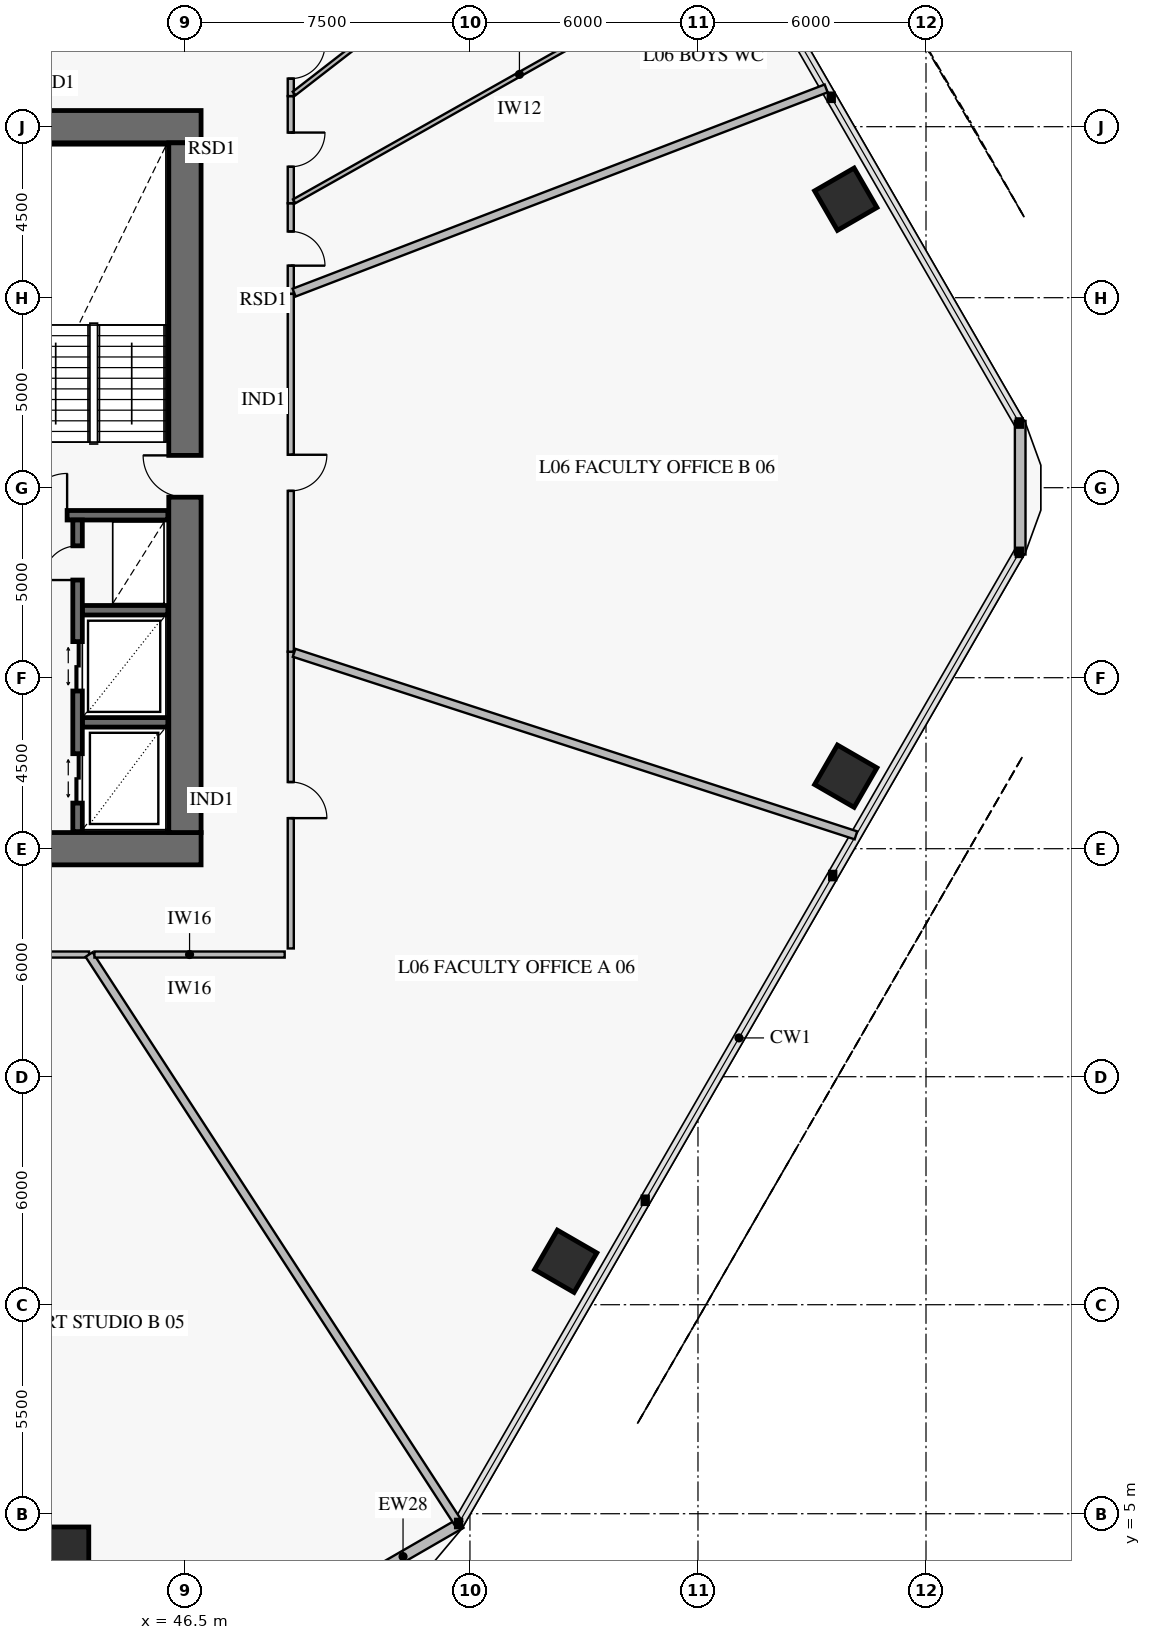
"""IFC4 building model, lengths in metres.
Left out: names, types, materials, properties, quantities, classifications, styles, units other than length and angle.
Written with IfcOpenShell. Run it as: python <this file> out.ifc"""

import sys

from ifc_helpers import new_model, si_unit, direction, frame, frame_2d, origin, origin_2d, place, context, subcontext, project, spatial, rectangle, extrude, element, fill, save


model = new_model("IFC4")
c1 = context("Model", 3, precision=1e-05, world=origin(), true_north=direction((0.0, 1.0)))
c2 = subcontext(c1, "Body", "Model", "MODEL_VIEW")
j1 = project(units=[si_unit("LENGTHUNIT", "METRE"), si_unit("PLANEANGLEUNIT", "RADIAN")], contexts=[c1])
p1 = place(None, origin())
s1 = spatial("IfcSite", under=j1, at=p1, CompositionType="ELEMENT")
p2 = place(p1, origin())
s2 = spatial("IfcBuilding", under=s1, at=p2, CompositionType="ELEMENT")
p3 = place(p2, frame((0.0, 0.0, 24.6)))
s3 = spatial("IfcBuildingStorey", under=s2, at=p3, CompositionType="ELEMENT", Elevation=24.6)
p4 = place(p3, frame((37.35, 22.5, 0.0), z_axis=(0.0, 0.0, 1.0), x_axis=(1.0, 0.0, 0.0)))
e1 = element("IfcWall", 1, at=p4, inside=s3, PredefinedType="SHEAR", context=c2, shape_type="SweptSolid", body=[
    extrude(rectangle(XDim=9.575, YDim=0.85, at=frame_2d((4.788, 0.0))), origin(), (0.0, 0.0, 1.0), 4.2),
])
p5 = place(p4, frame((3.95, 0.0, 0.0)))
e2 = element("IfcOpeningElement", 2, at=p5, cuts=e1, PredefinedType="OPENING", context=c2, shape_type="SweptSolid", body=[
    extrude(rectangle(XDim=1.5, YDim=2.15, at=frame_2d((0.75, 1.075))), frame((0.0, 0.437, 0.0), z_axis=(0.0, -1.0, 0.0), x_axis=(1.0, 0.0, 0.0)), (0.0, 0.0, 1.0), 0.874),
])
p6 = place(p3, frame((46.925, 41.5, 0.0), z_axis=(0.0, 0.0, 1.0), x_axis=(-1.0, 0.0, 0.0)))
e3 = element("IfcWall", 3, at=p6, inside=s3, PredefinedType="SHEAR", context=c2, shape_type="SweptSolid", body=[
    extrude(rectangle(XDim=7.975, YDim=0.85, at=frame_2d((3.988, 0.0))), origin(), (0.0, 0.0, 1.0), 4.2),
])
p7 = place(p3, frame((46.5, 22.925, 0.0), z_axis=(0.0, 0.0, 1.0), x_axis=(0.0, 1.0, 0.0)))
e4 = element("IfcWall", 4, at=p7, inside=s3, PredefinedType="SHEAR", context=c2, shape_type="SweptSolid", body=[
    extrude(rectangle(XDim=18.15, YDim=0.85, at=frame_2d((9.075, 0.0))), origin(), (0.0, 0.0, 1.0), 4.2),
])
p8 = place(p7, frame((8.825, 0.0, 0.0)))
e5 = element("IfcOpeningElement", 5, at=p8, cuts=e4, PredefinedType="OPENING", context=c2, shape_type="SweptSolid", body=[
    extrude(rectangle(XDim=1.1, YDim=2.15, at=frame_2d((0.55, 1.075))), frame((0.0, 0.437, 0.0), z_axis=(0.0, -1.0, 0.0), x_axis=(1.0, 0.0, 0.0)), (0.0, 0.0, 1.0), 0.874),
])
for number, where, z_axis, x_axis in (
    (6, (63.889, 39.592, 0.0), (0.0, 0.0, 1.0), (-0.5, 0.866, 0.0)),
    (7, (43.37, 4.052, 0.0), (0.0, 0.0, 1.0), (1.0, 0.0, 0.0)),
    (8, (56.519, 11.643, 0.0), (0.0, 0.0, 1.0), (0.5, 0.866, 0.0)),
    (9, (63.889, 24.408, 0.0), (0.0, 0.0, 1.0), (0.5, 0.866, 0.0)),
):
    element("IfcColumn", number, at=place(p3, frame(where, z_axis=z_axis, x_axis=x_axis)), inside=s3, PredefinedType="COLUMN", context=c2, shape_type="SweptSolid", body=[
        extrude(rectangle(XDim=1.2, YDim=1.2, at=origin_2d()), origin(), (0.0, 0.0, 1.0), 3.92),
    ])
p9 = place(p3, frame((53.761, 4.751, 0.0), z_axis=(0.0, 0.0, 1.0), x_axis=(-0.866007452331, -0.500031091541, 0.0)))
e10 = element("IfcWall", 10, at=p9, inside=s3, PredefinedType="SOLIDWALL", context=c2, shape_type="SweptSolid", body=[
    extrude(rectangle(XDim=3.515, YDim=0.28, at=frame_2d((1.757, 0.0))), origin(), (0.0, 0.0, 1.0), 3.92),
])
p10 = place(p3, frame((68.479, 33.758, 0.0), z_axis=(0.0, 0.0, 1.0), x_axis=(0.0, -1.0, 0.0)))
e11 = element("IfcWall", 11, at=p10, inside=s3, PredefinedType="SOLIDWALL", context=c2, shape_type="SweptSolid", body=[
    extrude(rectangle(XDim=3.515, YDim=0.28, at=frame_2d((1.758, 0.0))), origin(), (0.0, 0.0, 1.0), 3.92),
])
p11 = place(p3, frame((25.95, 31.275, 0.0), z_axis=(0.0, 0.0, 1.0), x_axis=(1.0, 0.0, 0.0)))
e12 = element("IfcWall", 12, at=p11, inside=s3, PredefinedType="SOLIDWALL", context=c2, shape_type="SweptSolid", body=[
    extrude(rectangle(XDim=20.1, YDim=0.25, at=frame_2d((10.05, 0.0))), origin(), (0.0, 0.0, 1.0), 4.2),
])
p12 = place(p11, frame((2.6, 0.0, 0.0)))
e13 = element("IfcOpeningElement", 13, at=p12, cuts=e12, PredefinedType="OPENING", context=c2, shape_type="SweptSolid", body=[
    extrude(rectangle(XDim=1.1, YDim=2.15, at=frame_2d((0.55, 1.075))), frame((0.0, 0.137, 0.0), z_axis=(0.0, -1.0, 0.0), x_axis=(1.0, 0.0, 0.0)), (0.0, 0.0, 1.0), 0.274),
])
p13 = place(p11, frame((10.6, 0.0, 0.0)))
e14 = element("IfcOpeningElement", 14, at=p13, cuts=e12, PredefinedType="OPENING", context=c2, shape_type="SweptSolid", body=[
    extrude(rectangle(XDim=1.1, YDim=2.15, at=frame_2d((0.55, 1.075))), frame((0.0, 0.137, 0.0), z_axis=(0.0, -1.0, 0.0), x_axis=(1.0, 0.0, 0.0)), (0.0, 0.0, 1.0), 0.274),
])
p14 = place(p11, frame((16.35, 0.0, 0.0)))
e15 = element("IfcOpeningElement", 15, at=p14, cuts=e12, PredefinedType="OPENING", context=c2, shape_type="SweptSolid", body=[
    extrude(rectangle(XDim=1.1, YDim=2.15, at=frame_2d((0.55, 1.075))), frame((0.0, 0.137, 0.0), z_axis=(0.0, -1.0, 0.0), x_axis=(1.0, 0.0, 0.0)), (0.0, 0.0, 1.0), 0.274),
])
for number, where, z_axis, x_axis in (
    (16, (43.8, 25.825, 0.0), (0.0, 0.0, 1.0), (1.0, 0.0, 0.0)),
    (17, (43.8, 28.775, 0.0), (0.0, 0.0, 1.0), (1.0, 0.0, 0.0)),
):
    element("IfcWall", number, at=place(p3, frame(where, z_axis=z_axis, x_axis=x_axis)), inside=s3, PredefinedType="SOLIDWALL", context=c2, shape_type="SweptSolid", body=[
        extrude(rectangle(XDim=2.25, YDim=0.25, at=frame_2d((1.125, 0.0))), origin(), (0.0, 0.0, 1.0), 4.2),
    ])
p15 = place(p3, frame((43.675, 22.95, 0.0), z_axis=(0.0, 0.0, 1.0), x_axis=(0.0, 1.0, 0.0)))
e18 = element("IfcWall", 18, at=p15, inside=s3, PredefinedType="SOLIDWALL", context=c2, shape_type="SweptSolid", body=[
    extrude(rectangle(XDim=8.2, YDim=0.25, at=frame_2d((4.1, 0.0))), origin(), (0.0, 0.0, 1.0), 4.2),
])
p16 = place(p15, frame((0.75, 0.0, 0.0)))
e19 = element("IfcOpeningElement", 19, at=p16, cuts=e18, PredefinedType="OPENING", context=c2, shape_type="SweptSolid", body=[
    extrude(rectangle(XDim=1.3, YDim=2.3, at=frame_2d((0.65, 1.15))), frame((0.0, 0.137, 0.0), z_axis=(0.0, -1.0, 0.0), x_axis=(1.0, 0.0, 0.0)), (0.0, 0.0, 1.0), 0.274),
])
p17 = place(p15, frame((3.7, 0.0, 0.0)))
e20 = element("IfcOpeningElement", 20, at=p17, cuts=e18, PredefinedType="OPENING", context=c2, shape_type="SweptSolid", body=[
    extrude(rectangle(XDim=1.3, YDim=2.3, at=frame_2d((0.65, 1.15))), frame((0.0, 0.137, 0.0), z_axis=(0.0, -1.0, 0.0), x_axis=(1.0, 0.0, 0.0)), (0.0, 0.0, 1.0), 0.274),
])
p18 = place(p15, frame((6.62, 0.0, 0.0)))
e21 = element("IfcOpeningElement", 21, at=p18, cuts=e18, PredefinedType="OPENING", context=c2, shape_type="SweptSolid", body=[
    extrude(rectangle(XDim=0.9, YDim=2.1, at=frame_2d((0.45, 1.05))), frame((0.0, 0.137, 0.0), z_axis=(0.0, -1.0, 0.0), x_axis=(1.0, 0.0, 0.0)), (0.0, 0.0, 1.0), 0.274),
])
p19 = place(p3, frame((49.285, 37.1, 0.0), z_axis=(0.0, 0.0, 1.0), x_axis=(0.0, 1.0, 0.0)))
e22 = element("IfcWall", 22, at=p19, inside=s3, PredefinedType="PARTITIONING", context=c2, shape_type="SweptSolid", body=[
    extrude(rectangle(XDim=2.386, YDim=0.16, at=frame_2d((1.193, 0.0))), origin(), (0.0, 0.0, 1.0), 3.92),
])
p20 = place(p19, frame((0.743, 0.0, 0.0)))
e23 = element("IfcOpeningElement", 23, at=p20, cuts=e22, PredefinedType="OPENING", context=c2, shape_type="SweptSolid", body=[
    extrude(rectangle(XDim=0.9, YDim=2.1, at=frame_2d((0.45, 1.05))), frame((0.0, 0.092, 0.0), z_axis=(0.0, -1.0, 0.0), x_axis=(1.0, 0.0, 0.0)), (0.0, 0.0, 1.0), 0.184),
])
p21 = place(p3, frame((49.285, 39.486, 0.0), z_axis=(0.0, 0.0, 1.0), x_axis=(0.0, 1.0, 0.0)))
e24 = element("IfcWall", 24, at=p21, inside=s3, PredefinedType="PARTITIONING", context=c2, shape_type="SweptSolid", body=[
    extrude(rectangle(XDim=2.819, YDim=0.16, at=frame_2d((1.41, 0.0))), origin(), (0.0, 0.0, 1.0), 3.92),
])
p22 = place(p21, frame((0.96, 0.0, 0.0)))
e25 = element("IfcOpeningElement", 25, at=p22, cuts=e24, PredefinedType="OPENING", context=c2, shape_type="SweptSolid", body=[
    extrude(rectangle(XDim=0.9, YDim=2.1, at=frame_2d((0.45, 1.05))), frame((0.0, 0.092, 0.0), z_axis=(0.0, -1.0, 0.0), x_axis=(1.0, 0.0, 0.0)), (0.0, 0.0, 1.0), 0.184),
])
p23 = place(p3, frame((49.285, 42.305, 0.0), z_axis=(0.0, 0.0, 1.0), x_axis=(0.0, 1.0, 0.0)))
e26 = element("IfcWall", 26, at=p23, inside=s3, PredefinedType="PARTITIONING", context=c2, shape_type="SweptSolid", body=[
    extrude(rectangle(XDim=1.82, YDim=0.16, at=frame_2d((0.91, 0.0))), origin(), (0.0, 0.0, 1.0), 3.92),
])
p24 = place(p23, frame((0.46, 0.0, 0.0)))
e27 = element("IfcOpeningElement", 27, at=p24, cuts=e26, PredefinedType="OPENING", context=c2, shape_type="SweptSolid", body=[
    extrude(rectangle(XDim=0.9, YDim=2.1, at=frame_2d((0.45, 1.05))), frame((0.0, 0.092, 0.0), z_axis=(0.0, -1.0, 0.0), x_axis=(1.0, 0.0, 0.0)), (0.0, 0.0, 1.0), 0.184),
])
p25 = place(p3, frame((37.508, 19.715, 0.0), z_axis=(0.0, 0.0, 1.0), x_axis=(1.0, 0.0, 0.0)))
e28 = element("IfcWall", 28, at=p25, inside=s3, PredefinedType="PARTITIONING", context=c2, shape_type="SweptSolid", body=[
    extrude(rectangle(XDim=6.47, YDim=0.16, at=frame_2d((3.235, 0.0))), origin(), (0.0, 0.0, 1.0), 3.22),
])
p26 = place(p25, frame((2.66, 0.0, 0.0)))
e29 = element("IfcOpeningElement", 29, at=p26, cuts=e28, PredefinedType="OPENING", context=c2, shape_type="SweptSolid", body=[
    extrude(rectangle(XDim=1.15, YDim=2.2, at=frame_2d((0.575, 1.1))), frame((0.0, 0.092, 0.0), z_axis=(0.0, -1.0, 0.0), x_axis=(1.0, 0.0, 0.0)), (0.0, 0.0, 1.0), 0.184),
])
p27 = place(p3, frame((49.285, 19.875, 0.0), z_axis=(0.0, 0.0, 1.0), x_axis=(0.0, 1.0, 0.0)))
e30 = element("IfcWall", 30, at=p27, inside=s3, PredefinedType="PARTITIONING", context=c2, shape_type="SweptSolid", body=[
    extrude(rectangle(XDim=7.808, YDim=0.16, at=frame_2d((3.904, 0.0))), origin(), (0.0, 0.0, 1.0), 3.92),
])
p28 = place(p27, frame((3.429, 0.0, 0.0)))
e31 = element("IfcOpeningElement", 31, at=p28, cuts=e30, PredefinedType="OPENING", context=c2, shape_type="SweptSolid", body=[
    extrude(rectangle(XDim=0.95, YDim=2.1, at=frame_2d((0.475, 1.05))), frame((0.0, 0.092, 0.0), z_axis=(0.0, -1.0, 0.0), x_axis=(1.0, 0.0, 0.0)), (0.0, 0.0, 1.0), 0.184),
])
p29 = place(p3, frame((49.285, 27.683, 0.0), z_axis=(0.0, 0.0, 1.0), x_axis=(0.0, 1.0, 0.0)))
e32 = element("IfcWall", 32, at=p29, inside=s3, PredefinedType="PARTITIONING", context=c2, shape_type="SweptSolid", body=[
    extrude(rectangle(XDim=9.416, YDim=0.16, at=frame_2d((4.708, 0.0))), origin(), (0.0, 0.0, 1.0), 3.22),
])
p30 = place(p29, frame((4.233, 0.0, 0.0)))
e33 = element("IfcOpeningElement", 33, at=p30, cuts=e32, PredefinedType="OPENING", context=c2, shape_type="SweptSolid", body=[
    extrude(rectangle(XDim=0.95, YDim=2.1, at=frame_2d((0.475, 1.05))), frame((0.0, 0.092, 0.0), z_axis=(0.0, -1.0, 0.0), x_axis=(1.0, 0.0, 0.0)), (0.0, 0.0, 1.0), 0.184),
])
p31 = place(p3, frame((49.373, 37.134, 0.0), z_axis=(0.0, 0.0, 1.0), x_axis=(0.933584586871, 0.358357111214, 0.0)))
e34 = element("IfcWall", 34, at=p31, inside=s3, PredefinedType="PARTITIONING", context=c2, shape_type="SweptSolid", body=[
    extrude(rectangle(XDim=14.995, YDim=0.22, at=frame_2d((7.498, 0.0))), origin(), (0.0, 0.0, 1.0), 3.17),
])
p32 = place(p3, frame((49.373, 39.535, 0.0), z_axis=(0.0, 0.0, 1.0), x_axis=(0.871218886354, 0.490894746417, 0.0)))
e35 = element("IfcWall", 35, at=p32, inside=s3, PredefinedType="PARTITIONING", context=c2, shape_type="SweptSolid", body=[
    extrude(rectangle(XDim=13.61, YDim=0.12, at=frame_2d((6.805, 0.0))), origin(), (0.0, 0.0, 1.0), 3.17),
])
p33 = place(p3, frame((49.373, 42.373, 0.0), z_axis=(0.0, 0.0, 1.0), x_axis=(0.790162754328, 0.612897072658, 0.0)))
e36 = element("IfcWall", 36, at=p33, inside=s3, PredefinedType="PARTITIONING", context=c2, shape_type="SweptSolid", body=[
    extrude(rectangle(XDim=4.991, YDim=0.12, at=frame_2d((2.496, 0.0))), origin(), (0.0, 0.0, 1.0), 3.47),
])
p34 = place(p3, frame((43.978, 19.715, 0.0), z_axis=(0.0, 0.0, 1.0), x_axis=(0.544630677499, -0.838675995321, 0.0)))
e37 = element("IfcWall", 37, at=p34, inside=s3, PredefinedType="PARTITIONING", context=c2, shape_type="SweptSolid", body=[
    extrude(rectangle(XDim=17.853, YDim=0.22, at=frame_2d((8.926, 0.0))), origin(), (0.0, 0.0, 1.0), 3.17),
])
p35 = place(p3, frame((49.373, 27.655, 0.0), z_axis=(0.0, 0.0, 1.0), x_axis=(0.951055880984, -0.309018949654, 0.0)))
e38 = element("IfcWall", 38, at=p35, inside=s3, PredefinedType="PARTITIONING", context=c2, shape_type="SweptSolid", body=[
    extrude(rectangle(XDim=15.544, YDim=0.22, at=frame_2d((7.772, 0.0))), origin(), (0.0, 0.0, 1.0), 3.17),
])
p36 = place(p3, frame((44.119, 19.715, 0.0), z_axis=(0.0, 0.0, 1.0), x_axis=(1.0, 0.0, 0.0)))
e39 = element("IfcWall", 39, at=p36, inside=s3, PredefinedType="PARTITIONING", context=c2, shape_type="SweptSolid", body=[
    extrude(rectangle(XDim=5.006, YDim=0.16, at=frame_2d((2.503, 0.0))), origin(), (0.0, 0.0, 1.0), 3.22),
])
p37 = place(p8, origin())
e40 = element("IfcDoor", 40, at=p37, inside=s3, OperationType="SINGLE_SWING_RIGHT", PredefinedType="USERDEFINED", context=c2, shape_type="SweptSolid", body=[
    extrude(rectangle(XDim=1.1, YDim=2.15, at=frame_2d((0.55, 1.075))), frame((0.0, 0.025, 0.0), z_axis=(0.0, -1.0, 0.0), x_axis=(1.0, 0.0, 0.0)), (0.0, 0.0, 1.0), 0.05),
])
fill(e5, e40)
p38 = place(p14, origin())
e41 = element("IfcDoor", 41, at=p38, inside=s3, OperationType="SINGLE_SWING_RIGHT", PredefinedType="USERDEFINED", context=c2, shape_type="SweptSolid", body=[
    extrude(rectangle(XDim=1.1, YDim=2.15, at=frame_2d((0.55, 1.075))), frame((0.0, 0.025, 0.0), z_axis=(0.0, -1.0, 0.0), x_axis=(1.0, 0.0, 0.0)), (0.0, 0.0, 1.0), 0.05),
])
fill(e15, e41)
p39 = place(p16, origin())
e42 = element("IfcDoor", 42, at=p39, inside=s3, OperationType="DOUBLE_DOOR_SLIDING", PredefinedType="DOOR", context=c2, shape_type="SweptSolid", body=[
    extrude(rectangle(XDim=1.3, YDim=2.3, at=frame_2d((0.65, 1.15))), frame((0.0, 0.025, 0.0), z_axis=(0.0, -1.0, 0.0), x_axis=(1.0, 0.0, 0.0)), (0.0, 0.0, 1.0), 0.05),
])
fill(e19, e42)
p40 = place(p17, origin())
e43 = element("IfcDoor", 43, at=p40, inside=s3, OperationType="DOUBLE_DOOR_SLIDING", PredefinedType="DOOR", context=c2, shape_type="SweptSolid", body=[
    extrude(rectangle(XDim=1.3, YDim=2.3, at=frame_2d((0.65, 1.15))), frame((0.0, 0.025, 0.0), z_axis=(0.0, -1.0, 0.0), x_axis=(1.0, 0.0, 0.0)), (0.0, 0.0, 1.0), 0.05),
])
fill(e20, e43)
p41 = place(p18, origin())
e44 = element("IfcDoor", 44, at=p41, inside=s3, OperationType="SINGLE_SWING_LEFT", PredefinedType="DOOR", context=c2, shape_type="SweptSolid", body=[
    extrude(rectangle(XDim=0.9, YDim=2.1, at=frame_2d((0.45, 1.05))), frame((0.0, 0.025, 0.0), z_axis=(0.0, -1.0, 0.0), x_axis=(1.0, 0.0, 0.0)), (0.0, 0.0, 1.0), 0.05),
])
fill(e21, e44)
p42 = place(p20, frame((0.9, 0.0, 0.0), z_axis=(0.0, 0.0, 1.0), x_axis=(-1.0, 0.0, 0.0)))
e45 = element("IfcDoor", 45, at=p42, inside=s3, OperationType="SINGLE_SWING_RIGHT", PredefinedType="DOOR", context=c2, shape_type="SweptSolid", body=[
    extrude(rectangle(XDim=0.9, YDim=2.1, at=frame_2d((0.45, 1.05))), frame((0.0, 0.025, 0.0), z_axis=(0.0, -1.0, 0.0), x_axis=(1.0, 0.0, 0.0)), (0.0, 0.0, 1.0), 0.05),
])
fill(e23, e45)
p43 = place(p22, frame((0.9, 0.0, 0.0), z_axis=(0.0, 0.0, 1.0), x_axis=(-1.0, 0.0, 0.0)))
e46 = element("IfcDoor", 46, at=p43, inside=s3, OperationType="SINGLE_SWING_LEFT", PredefinedType="DOOR", context=c2, shape_type="SweptSolid", body=[
    extrude(rectangle(XDim=0.9, YDim=2.1, at=frame_2d((0.45, 1.05))), frame((0.0, 0.025, 0.0), z_axis=(0.0, -1.0, 0.0), x_axis=(1.0, 0.0, 0.0)), (0.0, 0.0, 1.0), 0.05),
])
fill(e25, e46)
p44 = place(p24, frame((0.9, 0.0, 0.0), z_axis=(0.0, 0.0, 1.0), x_axis=(-1.0, 0.0, 0.0)))
e47 = element("IfcDoor", 47, at=p44, inside=s3, OperationType="SINGLE_SWING_LEFT", PredefinedType="DOOR", context=c2, shape_type="SweptSolid", body=[
    extrude(rectangle(XDim=0.9, YDim=2.1, at=frame_2d((0.45, 1.05))), frame((0.0, 0.025, 0.0), z_axis=(0.0, -1.0, 0.0), x_axis=(1.0, 0.0, 0.0)), (0.0, 0.0, 1.0), 0.05),
])
fill(e27, e47)
p45 = place(p28, frame((0.95, 0.0, 0.0), z_axis=(0.0, 0.0, 1.0), x_axis=(-1.0, 0.0, 0.0)))
e48 = element("IfcDoor", 48, at=p45, inside=s3, OperationType="SINGLE_SWING_RIGHT", PredefinedType="DOOR", context=c2, shape_type="SweptSolid", body=[
    extrude(rectangle(XDim=0.95, YDim=2.1, at=frame_2d((0.475, 1.05))), frame((0.0, 0.025, 0.0), z_axis=(0.0, -1.0, 0.0), x_axis=(1.0, 0.0, 0.0)), (0.0, 0.0, 1.0), 0.05),
])
fill(e31, e48)
p46 = place(p30, frame((0.95, 0.0, 0.0), z_axis=(0.0, 0.0, 1.0), x_axis=(-1.0, 0.0, 0.0)))
e49 = element("IfcDoor", 49, at=p46, inside=s3, OperationType="SINGLE_SWING_LEFT", PredefinedType="DOOR", context=c2, shape_type="SweptSolid", body=[
    extrude(rectangle(XDim=0.95, YDim=2.1, at=frame_2d((0.475, 1.05))), frame((0.0, 0.025, 0.0), z_axis=(0.0, -1.0, 0.0), x_axis=(1.0, 0.0, 0.0)), (0.0, 0.0, 1.0), 0.05),
])
fill(e33, e49)
save(model, sys.argv[1])
